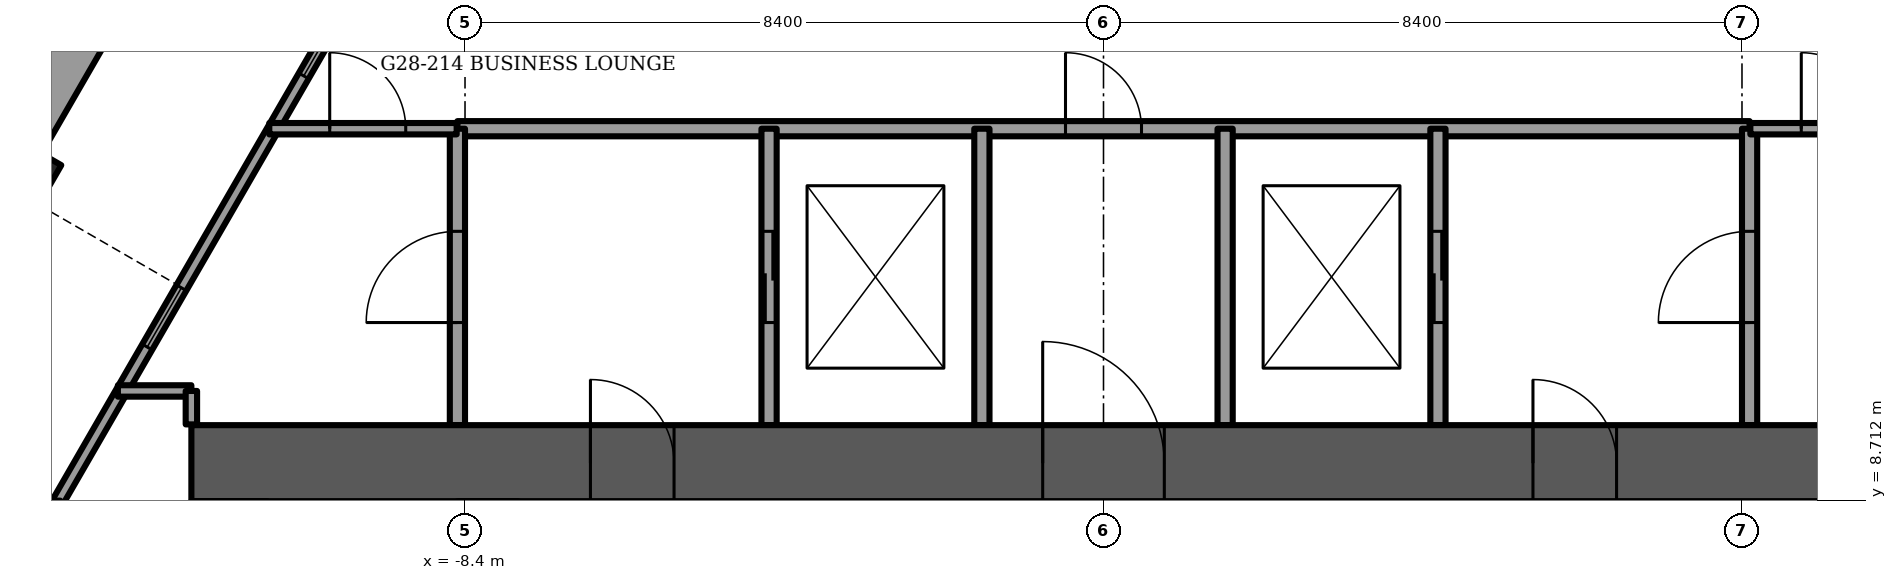
"""IFC4 building model, lengths in metres.
Left out: names, types, materials, properties, quantities, classifications, styles, units other than length and angle.
Written with IfcOpenShell. Run it as: python <this file> out.ifc"""

import sys

from ifc_helpers import new_model, si_unit, direction, frame, frame_2d, origin, origin_2d, place, context, subcontext, project, spatial, rectangle, extrude, element, fill, save


model = new_model("IFC4")
c1 = context("Model", 3, precision=1e-05, world=origin(), true_north=direction((0.0, 1.0)))
c2 = subcontext(c1, "Body", "Model", "MODEL_VIEW")
j1 = project(units=[si_unit("LENGTHUNIT", "METRE"), si_unit("PLANEANGLEUNIT", "RADIAN")], contexts=[c1])
p1 = place(None, origin())
s1 = spatial("IfcSite", under=j1, at=p1, CompositionType="ELEMENT")
p2 = place(p1, origin())
s2 = spatial("IfcBuilding", under=s1, at=p2, CompositionType="ELEMENT")
p3 = place(p2, frame((0.0, 0.0, 116.0)))
s3 = spatial("IfcBuildingStorey", under=s2, at=p3, CompositionType="ELEMENT", Elevation=116.0)
p4 = place(p3, frame((-14.531, 12.901, -1.2), z_axis=(0.0, 0.0, 1.0), x_axis=(0.5, 0.866025403784, 0.0)))
e1 = element("IfcColumn", 1, at=p4, inside=s3, PredefinedType="COLUMN", context=c2, shape_type="SweptSolid", body=[
    extrude(rectangle(XDim=1.2, YDim=1.2, at=origin_2d()), origin(), (0.0, 0.0, 1.0), 3.75),
])
p5 = place(p3, frame((-12.0, 9.2, -0.3), z_axis=(0.0, 0.0, 1.0), x_axis=(1.0, 0.0, 0.0)))
e2 = element("IfcWall", 2, at=p5, inside=s3, PredefinedType="SHEAR", context=c2, shape_type="SweptSolid", body=[
    extrude(rectangle(XDim=24.0, YDim=1.0, at=frame_2d((12.0, 0.0))), origin(), (0.0, 0.0, 1.0), 3.75),
])
p6 = place(p5, frame((11.2, 0.0, 0.0)))
e3 = element("IfcOpeningElement", 3, at=p6, cuts=e2, PredefinedType="OPENING", context=c2, shape_type="SweptSolid", body=[
    extrude(rectangle(XDim=1.6, YDim=2.1, at=frame_2d((0.8, 1.05))), frame((0.0, 0.5, 0.0), z_axis=(0.0, -1.0, 0.0), x_axis=(1.0, 0.0, 0.0)), (0.0, 0.0, 1.0), 1.0),
])
p7 = place(p5, frame((5.25, 0.0, 0.0)))
e4 = element("IfcOpeningElement", 4, at=p7, cuts=e2, PredefinedType="OPENING", context=c2, shape_type="SweptSolid", body=[
    extrude(rectangle(XDim=1.1, YDim=2.1, at=frame_2d((0.55, 1.05))), frame((0.0, 0.5, 0.0), z_axis=(0.0, -1.0, 0.0), x_axis=(1.0, 0.0, 0.0)), (0.0, 0.0, 1.0), 1.0),
])
p8 = place(p5, frame((17.65, 0.0, 0.0)))
e5 = element("IfcOpeningElement", 5, at=p8, cuts=e2, PredefinedType="OPENING", context=c2, shape_type="SweptSolid", body=[
    extrude(rectangle(XDim=1.1, YDim=2.1, at=frame_2d((0.55, 1.05))), frame((0.0, 0.5, 0.0), z_axis=(0.0, -1.0, 0.0), x_axis=(1.0, 0.0, 0.0)), (0.0, 0.0, 1.0), 1.0),
])
p9 = place(p3, frame((-11.017, 19.286, 0.0), z_axis=(0.0, 0.0, 1.0), x_axis=(-0.500012951941, -0.866017925849, 0.0)))
e6 = element("IfcWall", 6, at=p9, inside=s3, PredefinedType="PARAPET", context=c2, shape_type="SweptSolid", body=[
    extrude(rectangle(XDim=6.717, YDim=0.9, at=frame_2d((3.358, 0.0))), origin(), (0.0, 0.0, 1.0), 1.1),
])
p10 = place(p3, frame((-7.925, 18.792, 0.0), z_axis=(0.0, 0.0, 1.0), x_axis=(-0.499994842654, -0.866028381359, 0.0)))
e7 = element("IfcWall", 7, at=p10, inside=s3, PredefinedType="SOLIDWALL", context=c2, shape_type="SweptSolid", body=[
    extrude(rectangle(XDim=21.853, YDim=0.15, at=frame_2d((10.927, 0.0))), origin(), (0.0, 0.0, 1.0), 3.45),
])
p11 = place(p10, frame((4.293, 0.0, 0.15)))
e8 = element("IfcOpeningElement", 8, at=p11, cuts=e7, PredefinedType="OPENING", context=c2, shape_type="SweptSolid", body=[
    extrude(rectangle(XDim=0.9, YDim=2.85, at=frame_2d((0.45, 1.425))), frame((0.0, 0.075, 0.0), z_axis=(0.0, -1.0, 0.0), x_axis=(1.0, 0.0, 0.0)), (0.0, 0.0, 1.0), 0.15),
])
p12 = place(p10, frame((8.412, 0.0, 0.15)))
e9 = element("IfcOpeningElement", 9, at=p12, cuts=e7, PredefinedType="OPENING", context=c2, shape_type="SweptSolid", body=[
    extrude(rectangle(XDim=0.9, YDim=2.85, at=frame_2d((0.45, 1.425))), frame((0.0, 0.075, 0.0), z_axis=(0.0, -1.0, 0.0), x_axis=(1.0, 0.0, 0.0)), (0.0, 0.0, 1.0), 0.15),
])
p13 = place(p10, frame((12.612, 0.0, 0.15)))
e10 = element("IfcOpeningElement", 10, at=p13, cuts=e7, PredefinedType="OPENING", context=c2, shape_type="SweptSolid", body=[
    extrude(rectangle(XDim=1.7, YDim=2.85, at=frame_2d((0.85, 1.425))), frame((0.0, 0.075, 0.0), z_axis=(0.0, -1.0, 0.0), x_axis=(1.0, 0.0, 0.0)), (0.0, 0.0, 1.0), 0.15),
])
p14 = place(p10, frame((14.712, 0.0, 0.15)))
e11 = element("IfcOpeningElement", 11, at=p14, cuts=e7, PredefinedType="OPENING", context=c2, shape_type="SweptSolid", body=[
    extrude(rectangle(XDim=1.5, YDim=2.85, at=frame_2d((0.75, 1.425))), frame((0.0, 0.075, 0.0), z_axis=(0.0, -1.0, 0.0), x_axis=(1.0, 0.0, 0.0)), (0.0, 0.0, 1.0), 0.15),
])
p15 = place(p10, frame((16.812, 0.0, 0.15)))
e12 = element("IfcOpeningElement", 12, at=p15, cuts=e7, PredefinedType="OPENING", context=c2, shape_type="SweptSolid", body=[
    extrude(rectangle(XDim=1.7, YDim=2.85, at=frame_2d((0.85, 1.425))), frame((0.0, 0.075, 0.0), z_axis=(0.0, -1.0, 0.0), x_axis=(1.0, 0.0, 0.0)), (0.0, 0.0, 1.0), 0.15),
])
p16 = place(p10, frame((18.912, 0.0, 0.15)))
e13 = element("IfcOpeningElement", 13, at=p16, cuts=e7, PredefinedType="OPENING", context=c2, shape_type="SweptSolid", body=[
    extrude(rectangle(XDim=1.5, YDim=2.85, at=frame_2d((0.75, 1.425))), frame((0.0, 0.075, 0.0), z_axis=(0.0, -1.0, 0.0), x_axis=(1.0, 0.0, 0.0)), (0.0, 0.0, 1.0), 0.15),
])
p17 = place(p10, frame((1.022, 0.0, 0.15)))
e14 = element("IfcOpeningElement", 14, at=p17, cuts=e7, PredefinedType="OPENING", context=c2, shape_type="SweptSolid", body=[
    extrude(rectangle(XDim=1.7, YDim=2.73, at=frame_2d((0.85, 1.365))), frame((0.0, 0.075, 0.0), z_axis=(0.0, -1.0, 0.0), x_axis=(1.0, 0.0, 0.0)), (0.0, 0.0, 1.0), 0.15),
])
p18 = place(p3, frame((18.852, -0.133, 0.0), z_axis=(0.0, 0.0, 1.0), x_axis=(-0.499994842654, 0.866028381359, 0.0)))
e15 = element("IfcWall", 15, at=p18, inside=s3, PredefinedType="SOLIDWALL", context=c2, shape_type="SweptSolid", body=[
    extrude(rectangle(XDim=21.853, YDim=0.15, at=frame_2d((10.927, 0.0))), origin(), (0.0, 0.0, 1.0), 3.45),
])
p19 = place(p18, frame((1.441, 0.0, 0.15)))
e16 = element("IfcOpeningElement", 16, at=p19, cuts=e15, PredefinedType="OPENING", context=c2, shape_type="SweptSolid", body=[
    extrude(rectangle(XDim=1.7, YDim=2.85, at=frame_2d((0.85, 1.425))), frame((0.0, 0.075, 0.0), z_axis=(0.0, -1.0, 0.0), x_axis=(1.0, 0.0, 0.0)), (0.0, 0.0, 1.0), 0.15),
])
p20 = place(p18, frame((3.541, 0.0, 0.15)))
e17 = element("IfcOpeningElement", 17, at=p20, cuts=e15, PredefinedType="OPENING", context=c2, shape_type="SweptSolid", body=[
    extrude(rectangle(XDim=1.5, YDim=2.85, at=frame_2d((0.75, 1.425))), frame((0.0, 0.075, 0.0), z_axis=(0.0, -1.0, 0.0), x_axis=(1.0, 0.0, 0.0)), (0.0, 0.0, 1.0), 0.15),
])
p21 = place(p18, frame((5.641, 0.0, 0.15)))
e18 = element("IfcOpeningElement", 18, at=p21, cuts=e15, PredefinedType="OPENING", context=c2, shape_type="SweptSolid", body=[
    extrude(rectangle(XDim=1.7, YDim=2.85, at=frame_2d((0.85, 1.425))), frame((0.0, 0.075, 0.0), z_axis=(0.0, -1.0, 0.0), x_axis=(1.0, 0.0, 0.0)), (0.0, 0.0, 1.0), 0.15),
])
p22 = place(p18, frame((7.741, 0.0, 0.15)))
e19 = element("IfcOpeningElement", 19, at=p22, cuts=e15, PredefinedType="OPENING", context=c2, shape_type="SweptSolid", body=[
    extrude(rectangle(XDim=1.5, YDim=2.85, at=frame_2d((0.75, 1.425))), frame((0.0, 0.075, 0.0), z_axis=(0.0, -1.0, 0.0), x_axis=(1.0, 0.0, 0.0)), (0.0, 0.0, 1.0), 0.15),
])
p23 = place(p18, frame((10.531, 0.0, 0.15)))
e20 = element("IfcOpeningElement", 20, at=p23, cuts=e15, PredefinedType="OPENING", context=c2, shape_type="SweptSolid", body=[
    extrude(rectangle(XDim=0.9, YDim=2.85, at=frame_2d((0.45, 1.425))), frame((0.0, 0.075, 0.0), z_axis=(0.0, -1.0, 0.0), x_axis=(1.0, 0.0, 0.0)), (0.0, 0.0, 1.0), 0.15),
])
p24 = place(p18, frame((14.041, 0.0, 0.15)))
e21 = element("IfcOpeningElement", 21, at=p24, cuts=e15, PredefinedType="OPENING", context=c2, shape_type="SweptSolid", body=[
    extrude(rectangle(XDim=0.9, YDim=2.85, at=frame_2d((0.45, 1.425))), frame((0.0, 0.075, 0.0), z_axis=(0.0, -1.0, 0.0), x_axis=(1.0, 0.0, 0.0)), (0.0, 0.0, 1.0), 0.15),
])
p25 = place(p18, frame((19.132, 0.0, 0.15)))
e22 = element("IfcOpeningElement", 22, at=p25, cuts=e15, PredefinedType="OPENING", context=c2, shape_type="SweptSolid", body=[
    extrude(rectangle(XDim=1.7, YDim=2.73, at=frame_2d((0.85, 1.365))), frame((0.0, 0.075, 0.0), z_axis=(0.0, -1.0, 0.0), x_axis=(1.0, 0.0, 0.0)), (0.0, 0.0, 1.0), 0.15),
])
p26 = place(p3, frame((-8.5, 13.6, 0.0), z_axis=(0.0, 0.0, 1.0), x_axis=(1.0, 0.0, 0.0)))
e23 = element("IfcWall", 23, at=p26, inside=s3, PredefinedType="PARTITIONING", context=c2, shape_type="SweptSolid", body=[
    extrude(rectangle(XDim=17.0, YDim=0.2, at=frame_2d((8.5, 0.0))), origin(), (0.0, 0.0, 1.0), 3.45),
])
p27 = place(p26, frame((8.0, 0.0, 0.0)))
e24 = element("IfcOpeningElement", 24, at=p27, cuts=e23, PredefinedType="OPENING", context=c2, shape_type="SweptSolid", body=[
    extrude(rectangle(XDim=1.0, YDim=2.1, at=frame_2d((0.5, 1.05))), frame((0.0, 0.1, 0.0), z_axis=(0.0, -1.0, 0.0), x_axis=(1.0, 0.0, 0.0)), (0.0, 0.0, 1.0), 0.2),
])
p28 = place(p3, frame((-8.5, 9.7, 0.0), z_axis=(0.0, 0.0, 1.0), x_axis=(0.0, 1.0, 0.0)))
e25 = element("IfcWall", 25, at=p28, inside=s3, PredefinedType="PARTITIONING", context=c2, shape_type="SweptSolid", body=[
    extrude(rectangle(XDim=3.9, YDim=0.2, at=frame_2d((1.95, 0.0))), origin(), (0.0, 0.0, 1.0), 3.45),
])
p29 = place(p28, frame((1.35, 0.0, 0.0)))
e26 = element("IfcOpeningElement", 26, at=p29, cuts=e25, PredefinedType="OPENING", context=c2, shape_type="SweptSolid", body=[
    extrude(rectangle(XDim=1.2, YDim=2.1, at=frame_2d((0.6, 1.05))), frame((0.0, 0.1, 0.0), z_axis=(0.0, -1.0, 0.0), x_axis=(1.0, 0.0, 0.0)), (0.0, 0.0, 1.0), 0.2),
])
p30 = place(p3, frame((8.5, 9.7, 0.0), z_axis=(0.0, 0.0, 1.0), x_axis=(0.0, 1.0, 0.0)))
e27 = element("IfcWall", 27, at=p30, inside=s3, PredefinedType="PARTITIONING", context=c2, shape_type="SweptSolid", body=[
    extrude(rectangle(XDim=3.9, YDim=0.2, at=frame_2d((1.95, 0.0))), origin(), (0.0, 0.0, 1.0), 3.45),
])
p31 = place(p30, frame((1.35, 0.0, 0.0)))
e28 = element("IfcOpeningElement", 28, at=p31, cuts=e27, PredefinedType="OPENING", context=c2, shape_type="SweptSolid", body=[
    extrude(rectangle(XDim=1.2, YDim=2.1, at=frame_2d((0.6, 1.05))), frame((0.0, 0.1, 0.0), z_axis=(0.0, -1.0, 0.0), x_axis=(1.0, 0.0, 0.0)), (0.0, 0.0, 1.0), 0.2),
])
p32 = place(p3, frame((-4.4, 9.7, 0.0), z_axis=(0.0, 0.0, 1.0), x_axis=(0.0, 1.0, 0.0)))
e29 = element("IfcWall", 29, at=p32, inside=s3, PredefinedType="PARTITIONING", context=c2, shape_type="SweptSolid", body=[
    extrude(rectangle(XDim=3.9, YDim=0.2, at=frame_2d((1.95, 0.0))), origin(), (0.0, 0.0, 1.0), 3.45),
])
p33 = place(p32, frame((1.35, 0.0, 0.0)))
e30 = element("IfcOpeningElement", 30, at=p33, cuts=e29, PredefinedType="OPENING", context=c2, shape_type="SweptSolid", body=[
    extrude(rectangle(XDim=1.2, YDim=2.1, at=frame_2d((0.6, 1.05))), frame((0.0, 0.1, 0.0), z_axis=(0.0, -1.0, 0.0), x_axis=(1.0, 0.0, 0.0)), (0.0, 0.0, 1.0), 0.2),
])
p34 = place(p3, frame((4.4, 9.7, 0.0), z_axis=(0.0, 0.0, 1.0), x_axis=(0.0, 1.0, 0.0)))
e31 = element("IfcWall", 31, at=p34, inside=s3, PredefinedType="PARTITIONING", context=c2, shape_type="SweptSolid", body=[
    extrude(rectangle(XDim=3.9, YDim=0.2, at=frame_2d((1.95, 0.0))), origin(), (0.0, 0.0, 1.0), 3.45),
])
p35 = place(p34, frame((1.35, 0.0, 0.0)))
e32 = element("IfcOpeningElement", 32, at=p35, cuts=e31, PredefinedType="OPENING", context=c2, shape_type="SweptSolid", body=[
    extrude(rectangle(XDim=1.2, YDim=2.1, at=frame_2d((0.6, 1.05))), frame((0.0, 0.1, 0.0), z_axis=(0.0, -1.0, 0.0), x_axis=(1.0, 0.0, 0.0)), (0.0, 0.0, 1.0), 0.2),
])
for number, where, z_axis, x_axis in (
    (33, (-1.6, 9.7, 0.0), (0.0, 0.0, 1.0), (0.0, 1.0, 0.0)),
    (34, (1.6, 9.7, 0.0), (0.0, 0.0, 1.0), (0.0, 1.0, 0.0)),
):
    element("IfcWall", number, at=place(p3, frame(where, z_axis=z_axis, x_axis=x_axis)), inside=s3, PredefinedType="PARTITIONING", context=c2, shape_type="SweptSolid", body=[
        extrude(rectangle(XDim=3.9, YDim=0.2, at=frame_2d((1.95, 0.0))), origin(), (0.0, 0.0, 1.0), 3.45),
    ])
p36 = place(p3, frame((-12.967, 10.15, 0.0), z_axis=(0.0, 0.0, 1.0), x_axis=(1.0, 0.0, 0.0)))
e35 = element("IfcWall", 35, at=p36, inside=s3, PredefinedType="PARTITIONING", context=c2, shape_type="SweptSolid", body=[
    extrude(rectangle(XDim=0.967, YDim=0.15, at=frame_2d((0.483, 0.0))), origin(), (0.0, 0.0, 1.0), 3.45),
])
p37 = place(p3, frame((-10.975, 13.6, 0.0), z_axis=(0.0, 0.0, 1.0), x_axis=(1.0, 0.0, 0.0)))
e36 = element("IfcWall", 36, at=p37, inside=s3, PredefinedType="PARTITIONING", context=c2, shape_type="SweptSolid", body=[
    extrude(rectangle(XDim=2.465, YDim=0.15, at=frame_2d((1.232, 0.0))), origin(), (0.0, 0.0, 1.0), 3.45),
])
p38 = place(p37, frame((0.795, 0.0, 0.0)))
e37 = element("IfcOpeningElement", 37, at=p38, cuts=e36, PredefinedType="OPENING", context=c2, shape_type="SweptSolid", body=[
    extrude(rectangle(XDim=1.0, YDim=2.1, at=frame_2d((0.5, 1.05))), frame((0.0, 0.075, 0.0), z_axis=(0.0, -1.0, 0.0), x_axis=(1.0, 0.0, 0.0)), (0.0, 0.0, 1.0), 0.15),
])
p39 = place(p3, frame((8.51, 13.6, 0.0), z_axis=(0.0, 0.0, 1.0), x_axis=(1.0, 0.0, 0.0)))
e38 = element("IfcWall", 38, at=p39, inside=s3, PredefinedType="PARTITIONING", context=c2, shape_type="SweptSolid", body=[
    extrude(rectangle(XDim=2.465, YDim=0.15, at=frame_2d((1.232, 0.0))), origin(), (0.0, 0.0, 1.0), 3.45),
])
p40 = place(p39, frame((0.67, 0.0, 0.0)))
e39 = element("IfcOpeningElement", 39, at=p40, cuts=e38, PredefinedType="OPENING", context=c2, shape_type="SweptSolid", body=[
    extrude(rectangle(XDim=1.0, YDim=2.1, at=frame_2d((0.5, 1.05))), frame((0.0, 0.075, 0.0), z_axis=(0.0, -1.0, 0.0), x_axis=(1.0, 0.0, 0.0)), (0.0, 0.0, 1.0), 0.15),
])
p41 = place(p3, frame((-12.0, 9.71, 0.0), z_axis=(0.0, 0.0, 1.0), x_axis=(0.0, 1.0, 0.0)))
e40 = element("IfcWall", 40, at=p41, inside=s3, PredefinedType="PARTITIONING", context=c2, shape_type="SweptSolid", body=[
    extrude(rectangle(XDim=0.44, YDim=0.15, at=frame_2d((0.22, 0.0))), origin(), (0.0, 0.0, 1.0), 3.45),
])
p42 = place(p3, frame((-13.8, -3.7, 0.0), z_axis=(0.0, 0.0, 1.0), x_axis=(0.0, 1.0, 0.0)))
e41 = element("IfcWall", 41, at=p42, inside=s3, PredefinedType="PARTITIONING", context=c2, shape_type="SweptSolid", body=[
    extrude(rectangle(XDim=12.407, YDim=0.15, at=frame_2d((6.204, 0.0))), origin(), (0.0, 0.0, 1.0), 3.45),
])
p43 = place(p42, frame((0.55, 0.0, 0.0)))
e42 = element("IfcOpeningElement", 42, at=p43, cuts=e41, PredefinedType="OPENING", context=c2, shape_type="SweptSolid", body=[
    extrude(rectangle(XDim=1.0, YDim=2.1, at=frame_2d((0.5, 1.05))), frame((0.0, 0.075, 0.0), z_axis=(0.0, -1.0, 0.0), x_axis=(1.0, 0.0, 0.0)), (0.0, 0.0, 1.0), 0.15),
])
p44 = place(p42, frame((2.65, 0.0, 0.0)))
e43 = element("IfcOpeningElement", 43, at=p44, cuts=e41, PredefinedType="OPENING", context=c2, shape_type="SweptSolid", body=[
    extrude(rectangle(XDim=1.0, YDim=2.1, at=frame_2d((0.5, 1.05))), frame((0.0, 0.075, 0.0), z_axis=(0.0, -1.0, 0.0), x_axis=(1.0, 0.0, 0.0)), (0.0, 0.0, 1.0), 0.15),
])
p45 = place(p42, frame((7.683, 0.0, 0.0)))
e44 = element("IfcOpeningElement", 44, at=p45, cuts=e41, PredefinedType="OPENING", context=c2, shape_type="SweptSolid", body=[
    extrude(rectangle(XDim=1.0, YDim=2.1, at=frame_2d((0.5, 1.05))), frame((0.0, 0.075, 0.0), z_axis=(0.0, -1.0, 0.0), x_axis=(1.0, 0.0, 0.0)), (0.0, 0.0, 1.0), 0.15),
])
p46 = place(p11, origin())
e45 = element("IfcWindow", 45, at=p46, inside=s3, PartitioningType="SINGLE_PANEL", PredefinedType="WINDOW", context=c2, shape_type="SweptSolid", body=[
    extrude(rectangle(XDim=0.9, YDim=2.85, at=frame_2d((0.45, 1.425))), frame((0.0, 0.03, 0.0), z_axis=(0.0, -1.0, 0.0), x_axis=(1.0, 0.0, 0.0)), (0.0, 0.0, 1.0), 0.06),
])
fill(e8, e45)
p47 = place(p12, origin())
e46 = element("IfcWindow", 46, at=p47, inside=s3, PartitioningType="SINGLE_PANEL", PredefinedType="WINDOW", context=c2, shape_type="SweptSolid", body=[
    extrude(rectangle(XDim=0.9, YDim=2.85, at=frame_2d((0.45, 1.425))), frame((0.0, 0.03, 0.0), z_axis=(0.0, -1.0, 0.0), x_axis=(1.0, 0.0, 0.0)), (0.0, 0.0, 1.0), 0.06),
])
fill(e9, e46)
p48 = place(p6, origin())
e47 = element("IfcDoor", 47, at=p48, inside=s3, OperationType="DOUBLE_DOOR_SINGLE_SWING", PredefinedType="DOOR", context=c2, shape_type="SweptSolid", body=[
    extrude(rectangle(XDim=1.6, YDim=2.1, at=frame_2d((0.8, 1.05))), frame((0.0, 0.025, 0.0), z_axis=(0.0, -1.0, 0.0), x_axis=(1.0, 0.0, 0.0)), (0.0, 0.0, 1.0), 0.05),
])
fill(e3, e47)
p49 = place(p7, origin())
e48 = element("IfcDoor", 48, at=p49, inside=s3, OperationType="SINGLE_SWING_LEFT", PredefinedType="DOOR", context=c2, shape_type="SweptSolid", body=[
    extrude(rectangle(XDim=1.1, YDim=2.1, at=frame_2d((0.55, 1.05))), frame((0.0, 0.025, 0.0), z_axis=(0.0, -1.0, 0.0), x_axis=(1.0, 0.0, 0.0)), (0.0, 0.0, 1.0), 0.05),
])
fill(e4, e48)
p50 = place(p8, origin())
e49 = element("IfcDoor", 49, at=p50, inside=s3, OperationType="SINGLE_SWING_RIGHT", PredefinedType="DOOR", context=c2, shape_type="SweptSolid", body=[
    extrude(rectangle(XDim=1.1, YDim=2.1, at=frame_2d((0.55, 1.05))), frame((0.0, 0.025, 0.0), z_axis=(0.0, -1.0, 0.0), x_axis=(1.0, 0.0, 0.0)), (0.0, 0.0, 1.0), 0.05),
])
fill(e5, e49)
p51 = place(p33, origin())
e50 = element("IfcDoor", 50, at=p51, inside=s3, OperationType="SLIDING_TO_LEFT", PredefinedType="DOOR", context=c2, shape_type="SweptSolid", body=[
    extrude(rectangle(XDim=1.2, YDim=2.1, at=frame_2d((0.6, 1.05))), frame((0.0, 0.025, 0.0), z_axis=(0.0, -1.0, 0.0), x_axis=(1.0, 0.0, 0.0)), (0.0, 0.0, 1.0), 0.05),
])
fill(e30, e50)
p52 = place(p29, origin())
e51 = element("IfcDoor", 51, at=p52, inside=s3, OperationType="SINGLE_SWING_LEFT", PredefinedType="DOOR", context=c2, shape_type="SweptSolid", body=[
    extrude(rectangle(XDim=1.2, YDim=2.1, at=frame_2d((0.6, 1.05))), frame((0.0, 0.025, 0.0), z_axis=(0.0, -1.0, 0.0), x_axis=(1.0, 0.0, 0.0)), (0.0, 0.0, 1.0), 0.05),
])
fill(e26, e51)
p53 = place(p35, origin())
e52 = element("IfcDoor", 52, at=p53, inside=s3, OperationType="SLIDING_TO_LEFT", PredefinedType="DOOR", context=c2, shape_type="SweptSolid", body=[
    extrude(rectangle(XDim=1.2, YDim=2.1, at=frame_2d((0.6, 1.05))), frame((0.0, 0.025, 0.0), z_axis=(0.0, -1.0, 0.0), x_axis=(1.0, 0.0, 0.0)), (0.0, 0.0, 1.0), 0.05),
])
fill(e32, e52)
p54 = place(p31, origin())
e53 = element("IfcDoor", 53, at=p54, inside=s3, OperationType="SINGLE_SWING_LEFT", PredefinedType="DOOR", context=c2, shape_type="SweptSolid", body=[
    extrude(rectangle(XDim=1.2, YDim=2.1, at=frame_2d((0.6, 1.05))), frame((0.0, 0.025, 0.0), z_axis=(0.0, -1.0, 0.0), x_axis=(1.0, 0.0, 0.0)), (0.0, 0.0, 1.0), 0.05),
])
fill(e28, e53)
p55 = place(p27, origin())
e54 = element("IfcDoor", 54, at=p55, inside=s3, OperationType="SINGLE_SWING_LEFT", PredefinedType="DOOR", context=c2, shape_type="SweptSolid", body=[
    extrude(rectangle(XDim=1.0, YDim=2.1, at=frame_2d((0.5, 1.05))), frame((0.0, 0.025, 0.0), z_axis=(0.0, -1.0, 0.0), x_axis=(1.0, 0.0, 0.0)), (0.0, 0.0, 1.0), 0.05),
])
fill(e24, e54)
p56 = place(p38, origin())
e55 = element("IfcDoor", 55, at=p56, inside=s3, OperationType="SINGLE_SWING_RIGHT", PredefinedType="DOOR", context=c2, shape_type="SweptSolid", body=[
    extrude(rectangle(XDim=1.0, YDim=2.1, at=frame_2d((0.5, 1.05))), frame((0.0, 0.025, 0.0), z_axis=(0.0, -1.0, 0.0), x_axis=(1.0, 0.0, 0.0)), (0.0, 0.0, 1.0), 0.05),
])
fill(e37, e55)
p57 = place(p40, origin())
e56 = element("IfcDoor", 56, at=p57, inside=s3, OperationType="SINGLE_SWING_LEFT", PredefinedType="DOOR", context=c2, shape_type="SweptSolid", body=[
    extrude(rectangle(XDim=1.0, YDim=2.1, at=frame_2d((0.5, 1.05))), frame((0.0, 0.025, 0.0), z_axis=(0.0, -1.0, 0.0), x_axis=(1.0, 0.0, 0.0)), (0.0, 0.0, 1.0), 0.05),
])
fill(e39, e56)
save(model, sys.argv[1])
